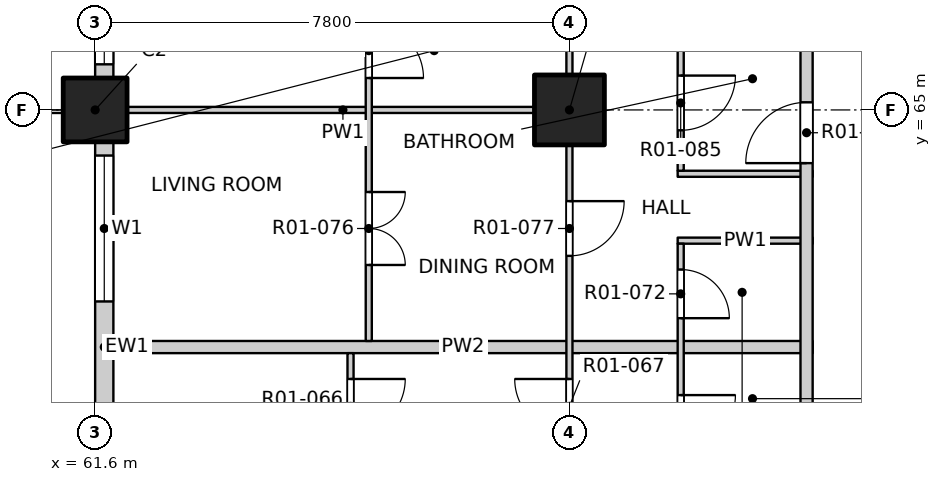
"""IFC4 building model, lengths in metres.
Left out: names, types, materials, properties, quantities, classifications, styles, units other than length and angle.
Written with IfcOpenShell. Run it as: python <this file> out.ifc"""

import sys

from ifc_helpers import new_model, si_unit, direction, frame, frame_2d, origin, origin_2d, place, context, subcontext, project, spatial, rectangle, extrude, element, fill, save


model = new_model("IFC4")
c1 = context("Model", 3, precision=1e-05, world=origin(), true_north=direction((0.0, 1.0)))
c2 = subcontext(c1, "Body", "Model", "MODEL_VIEW")
j1 = project(units=[si_unit("LENGTHUNIT", "METRE"), si_unit("PLANEANGLEUNIT", "RADIAN")], contexts=[c1])
p1 = place(None, origin())
s1 = spatial("IfcSite", under=j1, at=p1, CompositionType="ELEMENT")
p2 = place(p1, origin())
s2 = spatial("IfcBuilding", under=s1, at=p2, CompositionType="ELEMENT")
p3 = place(p2, frame((0.0, 0.0, 26.3)))
s3 = spatial("IfcBuildingStorey", under=s2, at=p3, CompositionType="ELEMENT", Elevation=26.3)
p4 = place(p3, frame((61.6, 65.0, -0.25), z_axis=(0.0, 0.0, 1.0), x_axis=(1.0, 0.0, 0.0)))
e1 = element("IfcColumn", 1, at=p4, inside=s3, PredefinedType="COLUMN", context=c2, shape_type="SweptSolid", body=[
    extrude(rectangle(XDim=1.05, YDim=1.05, at=origin_2d()), origin(), (0.0, 0.0, 1.0), 3.4),
])
p5 = place(p3, frame((69.4, 65.0, -0.25), z_axis=(0.0, 0.0, 1.0), x_axis=(1.0, 0.0, 0.0)))
e2 = element("IfcColumn", 2, at=p5, inside=s3, PredefinedType="COLUMN", context=c2, shape_type="SweptSolid", body=[
    extrude(rectangle(XDim=1.15, YDim=1.15, at=origin_2d()), origin(), (0.0, 0.0, 1.0), 3.4),
])
p6 = place(p3, frame((61.75, 57.725, 0.0), z_axis=(0.0, 0.0, 1.0), x_axis=(0.0, 1.0, 0.0)))
e3 = element("IfcWall", 3, at=p6, inside=s3, PredefinedType="SOLIDWALL", context=c2, shape_type="SweptSolid", body=[
    extrude(rectangle(XDim=6.75, YDim=0.3, at=frame_2d((3.375, 0.0))), origin(), (0.0, 0.0, 1.0), 2.7),
])
p7 = place(p6, frame((0.525, 0.0, 0.0)))
e4 = element("IfcOpeningElement", 4, at=p7, cuts=e3, PredefinedType="OPENING", context=c2, shape_type="SweptSolid", body=[
    extrude(rectangle(XDim=1.8, YDim=2.4, at=frame_2d((0.9, 1.2))), frame((0.0, 0.16, 0.0), z_axis=(0.0, -1.0, 0.0), x_axis=(1.0, 0.0, 0.0)), (0.0, 0.0, 1.0), 0.32),
])
p8 = place(p6, frame((4.125, 0.0, 0.9)))
e5 = element("IfcOpeningElement", 5, at=p8, cuts=e3, PredefinedType="OPENING", context=c2, shape_type="SweptSolid", body=[
    extrude(rectangle(XDim=2.4, YDim=1.8, at=frame_2d((1.2, 0.9))), frame((0.0, 0.16, 0.0), z_axis=(0.0, -1.0, 0.0), x_axis=(1.0, 0.0, 0.0)), (0.0, 0.0, 1.0), 0.32),
])
p9 = place(p3, frame((61.75, 65.525, 0.0), z_axis=(0.0, 0.0, 1.0), x_axis=(0.0, 1.0, 0.0)))
e6 = element("IfcWall", 6, at=p9, inside=s3, PredefinedType="SOLIDWALL", context=c2, shape_type="SweptSolid", body=[
    extrude(rectangle(XDim=6.75, YDim=0.3, at=frame_2d((3.375, 0.0))), origin(), (0.0, 0.0, 1.0), 2.7),
])
p10 = place(p9, frame((0.225, 0.0, 0.9)))
e7 = element("IfcOpeningElement", 7, at=p10, cuts=e6, PredefinedType="OPENING", context=c2, shape_type="SweptSolid", body=[
    extrude(rectangle(XDim=2.4, YDim=1.8, at=frame_2d((1.2, 0.9))), frame((0.0, 0.16, 0.0), z_axis=(0.0, -1.0, 0.0), x_axis=(1.0, 0.0, 0.0)), (0.0, 0.0, 1.0), 0.32),
])
p11 = place(p9, frame((4.125, 0.0, 0.9)))
e8 = element("IfcOpeningElement", 8, at=p11, cuts=e6, PredefinedType="OPENING", context=c2, shape_type="SweptSolid", body=[
    extrude(rectangle(XDim=2.4, YDim=1.8, at=frame_2d((1.2, 0.9))), frame((0.0, 0.16, 0.0), z_axis=(0.0, -1.0, 0.0), x_axis=(1.0, 0.0, 0.0)), (0.0, 0.0, 1.0), 0.32),
])
p12 = place(p3, frame((61.9, 61.1, 0.0), z_axis=(0.0, 0.0, 1.0), x_axis=(1.0, 0.0, 0.0)))
e9 = element("IfcWall", 9, at=p12, inside=s3, PredefinedType="PARTITIONING", context=c2, shape_type="SweptSolid", body=[
    extrude(rectangle(XDim=11.5, YDim=0.2, at=frame_2d((5.75, 0.0))), origin(), (0.0, 0.0, 1.0), 3.15),
])
for number, where, z_axis, x_axis in (
    (10, (71.18, 62.85, 0.0), (0.0, 0.0, 1.0), (1.0, 0.0, 0.0)),
    (11, (71.18, 63.95, 0.0), (0.0, 0.0, 1.0), (1.0, 0.0, 0.0)),
):
    element("IfcWall", number, at=place(p3, frame(where, z_axis=z_axis, x_axis=x_axis)), inside=s3, PredefinedType="PARTITIONING", context=c2, shape_type="SweptSolid", body=[
        extrude(rectangle(XDim=2.22, YDim=0.1, at=frame_2d((1.11, 0.0))), origin(), (0.0, 0.0, 1.0), 3.15),
    ])
p13 = place(p3, frame((61.9, 65.0, 0.0), z_axis=(0.0, 0.0, 1.0), x_axis=(1.0, 0.0, 0.0)))
e12 = element("IfcWall", 12, at=p13, inside=s3, PredefinedType="PARTITIONING", context=c2, shape_type="SweptSolid", body=[
    extrude(rectangle(XDim=7.55, YDim=0.1, at=frame_2d((3.775, 0.0))), origin(), (0.0, 0.0, 1.0), 2.55),
])
p14 = place(p3, frame((65.8, 41.9, 0.0), z_axis=(0.0, 0.0, 1.0), x_axis=(0.0, 1.0, 0.0)))
e13 = element("IfcWall", 13, at=p14, inside=s3, PredefinedType="PARTITIONING", context=c2, shape_type="SweptSolid", body=[
    extrude(rectangle(XDim=19.1, YDim=0.1, at=frame_2d((9.55, 0.0))), origin(), (0.0, 0.0, 1.0), 3.15),
])
p15 = place(p14, frame((1.05, 0.0, 0.0)))
e14 = element("IfcOpeningElement", 14, at=p15, cuts=e13, PredefinedType="OPENING", context=c2, shape_type="SweptSolid", body=[
    extrude(rectangle(XDim=1.2, YDim=2.1, at=frame_2d((0.6, 1.05))), frame((0.0, 0.06, 0.0), z_axis=(0.0, -1.0, 0.0), x_axis=(1.0, 0.0, 0.0)), (0.0, 0.0, 1.0), 0.12),
])
p16 = place(p14, frame((4.95, 0.0, 0.0)))
e15 = element("IfcOpeningElement", 15, at=p16, cuts=e13, PredefinedType="OPENING", context=c2, shape_type="SweptSolid", body=[
    extrude(rectangle(XDim=1.2, YDim=2.1, at=frame_2d((0.6, 1.05))), frame((0.0, 0.06, 0.0), z_axis=(0.0, -1.0, 0.0), x_axis=(1.0, 0.0, 0.0)), (0.0, 0.0, 1.0), 0.12),
])
p17 = place(p14, frame((8.85, 0.0, 0.0)))
e16 = element("IfcOpeningElement", 16, at=p17, cuts=e13, PredefinedType="OPENING", context=c2, shape_type="SweptSolid", body=[
    extrude(rectangle(XDim=1.2, YDim=2.1, at=frame_2d((0.6, 1.05))), frame((0.0, 0.06, 0.0), z_axis=(0.0, -1.0, 0.0), x_axis=(1.0, 0.0, 0.0)), (0.0, 0.0, 1.0), 0.12),
])
p18 = place(p14, frame((11.925, 0.0, 0.0)))
e17 = element("IfcOpeningElement", 17, at=p18, cuts=e13, PredefinedType="OPENING", context=c2, shape_type="SweptSolid", body=[
    extrude(rectangle(XDim=0.9, YDim=2.1, at=frame_2d((0.45, 1.05))), frame((0.0, 0.06, 0.0), z_axis=(0.0, -1.0, 0.0), x_axis=(1.0, 0.0, 0.0)), (0.0, 0.0, 1.0), 0.12),
])
p19 = place(p14, frame((13.875, 0.0, 0.0)))
e18 = element("IfcOpeningElement", 18, at=p19, cuts=e13, PredefinedType="OPENING", context=c2, shape_type="SweptSolid", body=[
    extrude(rectangle(XDim=0.9, YDim=2.1, at=frame_2d((0.45, 1.05))), frame((0.0, 0.06, 0.0), z_axis=(0.0, -1.0, 0.0), x_axis=(1.0, 0.0, 0.0)), (0.0, 0.0, 1.0), 0.12),
])
p20 = place(p14, frame((15.825, 0.0, 0.0)))
e19 = element("IfcOpeningElement", 19, at=p20, cuts=e13, PredefinedType="OPENING", context=c2, shape_type="SweptSolid", body=[
    extrude(rectangle(XDim=0.9, YDim=2.1, at=frame_2d((0.45, 1.05))), frame((0.0, 0.06, 0.0), z_axis=(0.0, -1.0, 0.0), x_axis=(1.0, 0.0, 0.0)), (0.0, 0.0, 1.0), 0.12),
])
p21 = place(p14, frame((17.775, 0.0, 0.0)))
e20 = element("IfcOpeningElement", 20, at=p21, cuts=e13, PredefinedType="OPENING", context=c2, shape_type="SweptSolid", body=[
    extrude(rectangle(XDim=0.9, YDim=2.1, at=frame_2d((0.45, 1.05))), frame((0.0, 0.06, 0.0), z_axis=(0.0, -1.0, 0.0), x_axis=(1.0, 0.0, 0.0)), (0.0, 0.0, 1.0), 0.12),
])
p22 = place(p3, frame((66.1, 61.2, 0.0), z_axis=(0.0, 0.0, 1.0), x_axis=(0.0, 1.0, 0.0)))
e21 = element("IfcWall", 21, at=p22, inside=s3, PredefinedType="PARTITIONING", context=c2, shape_type="SweptSolid", body=[
    extrude(rectangle(XDim=7.6, YDim=0.1, at=frame_2d((3.8, 0.0))), origin(), (0.0, 0.0, 1.0), 3.15),
])
p23 = place(p22, frame((1.25, 0.0, 0.0)))
e22 = element("IfcOpeningElement", 22, at=p23, cuts=e21, PredefinedType="OPENING", context=c2, shape_type="SweptSolid", body=[
    extrude(rectangle(XDim=1.2, YDim=2.1, at=frame_2d((0.6, 1.05))), frame((0.0, 0.06, 0.0), z_axis=(0.0, -1.0, 0.0), x_axis=(1.0, 0.0, 0.0)), (0.0, 0.0, 1.0), 0.12),
])
p24 = place(p22, frame((4.325, 0.0, 0.0)))
e23 = element("IfcOpeningElement", 23, at=p24, cuts=e21, PredefinedType="OPENING", context=c2, shape_type="SweptSolid", body=[
    extrude(rectangle(XDim=0.9, YDim=2.1, at=frame_2d((0.45, 1.05))), frame((0.0, 0.06, 0.0), z_axis=(0.0, -1.0, 0.0), x_axis=(1.0, 0.0, 0.0)), (0.0, 0.0, 1.0), 0.12),
])
p25 = place(p22, frame((6.275, 0.0, 0.0)))
e24 = element("IfcOpeningElement", 24, at=p25, cuts=e21, PredefinedType="OPENING", context=c2, shape_type="SweptSolid", body=[
    extrude(rectangle(XDim=0.9, YDim=2.1, at=frame_2d((0.45, 1.05))), frame((0.0, 0.06, 0.0), z_axis=(0.0, -1.0, 0.0), x_axis=(1.0, 0.0, 0.0)), (0.0, 0.0, 1.0), 0.12),
])
p26 = place(p3, frame((69.4, 49.4, 0.0), z_axis=(0.0, 0.0, 1.0), x_axis=(0.0, 1.0, 0.0)))
e25 = element("IfcWall", 25, at=p26, inside=s3, PredefinedType="PARTITIONING", context=c2, shape_type="SweptSolid", body=[
    extrude(rectangle(XDim=31.2, YDim=0.1, at=frame_2d((15.6, 0.0))), origin(), (0.0, 0.0, 1.0), 3.15),
])
p27 = place(p26, frame((1.5, 0.0, 0.0)))
e26 = element("IfcOpeningElement", 26, at=p27, cuts=e25, PredefinedType="OPENING", context=c2, shape_type="SweptSolid", body=[
    extrude(rectangle(XDim=0.9, YDim=2.1, at=frame_2d((0.45, 1.05))), frame((0.0, 0.06, 0.0), z_axis=(0.0, -1.0, 0.0), x_axis=(1.0, 0.0, 0.0)), (0.0, 0.0, 1.0), 0.12),
])
p28 = place(p26, frame((6.225, 0.0, 0.0)))
e27 = element("IfcOpeningElement", 27, at=p28, cuts=e25, PredefinedType="OPENING", context=c2, shape_type="SweptSolid", body=[
    extrude(rectangle(XDim=0.9, YDim=2.1, at=frame_2d((0.45, 1.05))), frame((0.0, 0.06, 0.0), z_axis=(0.0, -1.0, 0.0), x_axis=(1.0, 0.0, 0.0)), (0.0, 0.0, 1.0), 0.12),
])
p29 = place(p26, frame((10.275, 0.0, 0.0)))
e28 = element("IfcOpeningElement", 28, at=p29, cuts=e25, PredefinedType="OPENING", context=c2, shape_type="SweptSolid", body=[
    extrude(rectangle(XDim=0.9, YDim=2.1, at=frame_2d((0.45, 1.05))), frame((0.0, 0.06, 0.0), z_axis=(0.0, -1.0, 0.0), x_axis=(1.0, 0.0, 0.0)), (0.0, 0.0, 1.0), 0.12),
])
p30 = place(p26, frame((13.2, 0.0, 0.0)))
e29 = element("IfcOpeningElement", 29, at=p30, cuts=e25, PredefinedType="OPENING", context=c2, shape_type="SweptSolid", body=[
    extrude(rectangle(XDim=0.9, YDim=2.1, at=frame_2d((0.45, 1.05))), frame((0.0, 0.06, 0.0), z_axis=(0.0, -1.0, 0.0), x_axis=(1.0, 0.0, 0.0)), (0.0, 0.0, 1.0), 0.12),
])
p31 = place(p26, frame((18.075, 0.0, 0.0)))
e30 = element("IfcOpeningElement", 30, at=p31, cuts=e25, PredefinedType="OPENING", context=c2, shape_type="SweptSolid", body=[
    extrude(rectangle(XDim=0.9, YDim=2.1, at=frame_2d((0.45, 1.05))), frame((0.0, 0.06, 0.0), z_axis=(0.0, -1.0, 0.0), x_axis=(1.0, 0.0, 0.0)), (0.0, 0.0, 1.0), 0.12),
])
p32 = place(p26, frame((21.8, 0.0, 0.0)))
e31 = element("IfcOpeningElement", 31, at=p32, cuts=e25, PredefinedType="OPENING", context=c2, shape_type="SweptSolid", body=[
    extrude(rectangle(XDim=0.9, YDim=2.1, at=frame_2d((0.45, 1.05))), frame((0.0, 0.06, 0.0), z_axis=(0.0, -1.0, 0.0), x_axis=(1.0, 0.0, 0.0)), (0.0, 0.0, 1.0), 0.12),
])
p33 = place(p26, frame((24.9, 0.0, 0.0)))
e32 = element("IfcOpeningElement", 32, at=p33, cuts=e25, PredefinedType="OPENING", context=c2, shape_type="SweptSolid", body=[
    extrude(rectangle(XDim=0.9, YDim=2.1, at=frame_2d((0.45, 1.05))), frame((0.0, 0.06, 0.0), z_axis=(0.0, -1.0, 0.0), x_axis=(1.0, 0.0, 0.0)), (0.0, 0.0, 1.0), 0.12),
])
p34 = place(p26, frame((29.6, 0.0, 0.0)))
e33 = element("IfcOpeningElement", 33, at=p34, cuts=e25, PredefinedType="OPENING", context=c2, shape_type="SweptSolid", body=[
    extrude(rectangle(XDim=0.9, YDim=2.1, at=frame_2d((0.45, 1.05))), frame((0.0, 0.06, 0.0), z_axis=(0.0, -1.0, 0.0), x_axis=(1.0, 0.0, 0.0)), (0.0, 0.0, 1.0), 0.12),
])
p35 = place(p3, frame((71.23, 55.6, 0.0), z_axis=(0.0, 0.0, 1.0), x_axis=(0.0, 1.0, 0.0)))
e34 = element("IfcWall", 34, at=p35, inside=s3, PredefinedType="PARTITIONING", context=c2, shape_type="SweptSolid", body=[
    extrude(rectangle(XDim=7.2, YDim=0.1, at=frame_2d((3.6, 0.0))), origin(), (0.0, 0.0, 1.0), 3.15),
])
p36 = place(p35, frame((1.035, 0.0, 0.0)))
e35 = element("IfcOpeningElement", 35, at=p36, cuts=e34, PredefinedType="OPENING", context=c2, shape_type="SweptSolid", body=[
    extrude(rectangle(XDim=0.9, YDim=2.1, at=frame_2d((0.45, 1.05))), frame((0.0, 0.06, 0.0), z_axis=(0.0, -1.0, 0.0), x_axis=(1.0, 0.0, 0.0)), (0.0, 0.0, 1.0), 0.12),
])
p37 = place(p35, frame((3.81, 0.0, 0.0)))
e36 = element("IfcOpeningElement", 36, at=p37, cuts=e34, PredefinedType="OPENING", context=c2, shape_type="SweptSolid", body=[
    extrude(rectangle(XDim=0.9, YDim=2.1, at=frame_2d((0.45, 1.05))), frame((0.0, 0.06, 0.0), z_axis=(0.0, -1.0, 0.0), x_axis=(1.0, 0.0, 0.0)), (0.0, 0.0, 1.0), 0.12),
])
p38 = place(p35, frame((5.975, 0.0, 0.0)))
e37 = element("IfcOpeningElement", 37, at=p38, cuts=e34, PredefinedType="OPENING", context=c2, shape_type="SweptSolid", body=[
    extrude(rectangle(XDim=0.8, YDim=2.1, at=frame_2d((0.4, 1.05))), frame((0.0, 0.06, 0.0), z_axis=(0.0, -1.0, 0.0), x_axis=(1.0, 0.0, 0.0)), (0.0, 0.0, 1.0), 0.12),
])
p39 = place(p3, frame((71.23, 64.0, 0.0), z_axis=(0.0, 0.0, 1.0), x_axis=(0.0, 1.0, 0.0)))
e38 = element("IfcWall", 38, at=p39, inside=s3, PredefinedType="PARTITIONING", context=c2, shape_type="SweptSolid", body=[
    extrude(rectangle(XDim=6.3, YDim=0.1, at=frame_2d((3.15, 0.0))), origin(), (0.0, 0.0, 1.0), 3.15),
])
p40 = place(p39, frame((0.665, 0.0, 0.0)))
e39 = element("IfcOpeningElement", 39, at=p40, cuts=e38, PredefinedType="OPENING", context=c2, shape_type="SweptSolid", body=[
    extrude(rectangle(XDim=0.9, YDim=2.1, at=frame_2d((0.45, 1.05))), frame((0.0, 0.06, 0.0), z_axis=(0.0, -1.0, 0.0), x_axis=(1.0, 0.0, 0.0)), (0.0, 0.0, 1.0), 0.12),
])
p41 = place(p39, frame((3.14, 0.0, 0.0)))
e40 = element("IfcOpeningElement", 40, at=p41, cuts=e38, PredefinedType="OPENING", context=c2, shape_type="SweptSolid", body=[
    extrude(rectangle(XDim=0.9, YDim=2.1, at=frame_2d((0.45, 1.05))), frame((0.0, 0.06, 0.0), z_axis=(0.0, -1.0, 0.0), x_axis=(1.0, 0.0, 0.0)), (0.0, 0.0, 1.0), 0.12),
])
p42 = place(p39, frame((5.175, 0.0, 0.0)))
e41 = element("IfcOpeningElement", 41, at=p42, cuts=e38, PredefinedType="OPENING", context=c2, shape_type="SweptSolid", body=[
    extrude(rectangle(XDim=0.9, YDim=2.1, at=frame_2d((0.45, 1.05))), frame((0.0, 0.06, 0.0), z_axis=(0.0, -1.0, 0.0), x_axis=(1.0, 0.0, 0.0)), (0.0, 0.0, 1.0), 0.12),
])
p43 = place(p3, frame((73.3, 53.4, 0.0), z_axis=(0.0, 0.0, 1.0), x_axis=(0.0, 1.0, 0.0)))
e42 = element("IfcWall", 42, at=p43, inside=s3, PredefinedType="PARTITIONING", context=c2, shape_type="SweptSolid", body=[
    extrude(rectangle(XDim=31.0, YDim=0.2, at=frame_2d((15.5, 0.0))), origin(), (0.0, 0.0, 1.0), 3.15),
])
p44 = place(p43, frame((2.325, 0.0, 0.0)))
e43 = element("IfcOpeningElement", 43, at=p44, cuts=e42, PredefinedType="OPENING", context=c2, shape_type="SweptSolid", body=[
    extrude(rectangle(XDim=1.0, YDim=2.1, at=frame_2d((0.5, 1.05))), frame((0.0, 0.11, 0.0), z_axis=(0.0, -1.0, 0.0), x_axis=(1.0, 0.0, 0.0)), (0.0, 0.0, 1.0), 0.22),
])
p45 = place(p43, frame((10.725, 0.0, 0.0)))
e44 = element("IfcOpeningElement", 44, at=p45, cuts=e42, PredefinedType="OPENING", context=c2, shape_type="SweptSolid", body=[
    extrude(rectangle(XDim=1.0, YDim=2.1, at=frame_2d((0.5, 1.05))), frame((0.0, 0.11, 0.0), z_axis=(0.0, -1.0, 0.0), x_axis=(1.0, 0.0, 0.0)), (0.0, 0.0, 1.0), 0.22),
])
p46 = place(p43, frame((18.225, 0.0, 0.0)))
e45 = element("IfcOpeningElement", 45, at=p46, cuts=e42, PredefinedType="OPENING", context=c2, shape_type="SweptSolid", body=[
    extrude(rectangle(XDim=1.0, YDim=2.1, at=frame_2d((0.5, 1.05))), frame((0.0, 0.11, 0.0), z_axis=(0.0, -1.0, 0.0), x_axis=(1.0, 0.0, 0.0)), (0.0, 0.0, 1.0), 0.22),
])
p47 = place(p43, frame((25.925, 0.0, 0.0)))
e46 = element("IfcOpeningElement", 46, at=p47, cuts=e42, PredefinedType="OPENING", context=c2, shape_type="SweptSolid", body=[
    extrude(rectangle(XDim=1.0, YDim=2.1, at=frame_2d((0.5, 1.05))), frame((0.0, 0.11, 0.0), z_axis=(0.0, -1.0, 0.0), x_axis=(1.0, 0.0, 0.0)), (0.0, 0.0, 1.0), 0.22),
])
p48 = place(p8, origin())
e47 = element("IfcWindow", 47, at=p48, inside=s3, PartitioningType="DOUBLE_PANEL_VERTICAL", PredefinedType="WINDOW", context=c2, shape_type="SweptSolid", body=[
    extrude(rectangle(XDim=2.4, YDim=1.8, at=frame_2d((1.2, 0.9))), frame((0.0, 0.03, 0.0), z_axis=(0.0, -1.0, 0.0), x_axis=(1.0, 0.0, 0.0)), (0.0, 0.0, 1.0), 0.06),
])
fill(e5, e47)
p49 = place(p10, origin())
e48 = element("IfcWindow", 48, at=p49, inside=s3, PartitioningType="DOUBLE_PANEL_VERTICAL", PredefinedType="WINDOW", context=c2, shape_type="SweptSolid", body=[
    extrude(rectangle(XDim=2.4, YDim=1.8, at=frame_2d((1.2, 0.9))), frame((0.0, 0.03, 0.0), z_axis=(0.0, -1.0, 0.0), x_axis=(1.0, 0.0, 0.0)), (0.0, 0.0, 1.0), 0.06),
])
fill(e7, e48)
p50 = place(p37, origin())
e49 = element("IfcDoor", 49, at=p50, inside=s3, OperationType="SINGLE_SWING_LEFT", PredefinedType="DOOR", context=c2, shape_type="SweptSolid", body=[
    extrude(rectangle(XDim=0.9, YDim=2.1, at=frame_2d((0.45, 1.05))), frame((0.0, 0.025, 0.0), z_axis=(0.0, -1.0, 0.0), x_axis=(1.0, 0.0, 0.0)), (0.0, 0.0, 1.0), 0.05),
])
fill(e36, e49)
p51 = place(p21, origin())
e50 = element("IfcDoor", 50, at=p51, inside=s3, OperationType="SINGLE_SWING_LEFT", PredefinedType="DOOR", context=c2, shape_type="SweptSolid", body=[
    extrude(rectangle(XDim=0.9, YDim=2.1, at=frame_2d((0.45, 1.05))), frame((0.0, 0.025, 0.0), z_axis=(0.0, -1.0, 0.0), x_axis=(1.0, 0.0, 0.0)), (0.0, 0.0, 1.0), 0.05),
])
fill(e20, e50)
p52 = place(p29, origin())
e51 = element("IfcDoor", 51, at=p52, inside=s3, OperationType="SINGLE_SWING_RIGHT", PredefinedType="DOOR", context=c2, shape_type="SweptSolid", body=[
    extrude(rectangle(XDim=0.9, YDim=2.1, at=frame_2d((0.45, 1.05))), frame((0.0, 0.025, 0.0), z_axis=(0.0, -1.0, 0.0), x_axis=(1.0, 0.0, 0.0)), (0.0, 0.0, 1.0), 0.05),
])
fill(e28, e51)
p53 = place(p38, origin())
e52 = element("IfcDoor", 52, at=p53, inside=s3, OperationType="SINGLE_SWING_RIGHT", PredefinedType="DOOR", context=c2, shape_type="SweptSolid", body=[
    extrude(rectangle(XDim=0.8, YDim=2.1, at=frame_2d((0.4, 1.05))), frame((0.0, 0.025, 0.0), z_axis=(0.0, -1.0, 0.0), x_axis=(1.0, 0.0, 0.0)), (0.0, 0.0, 1.0), 0.05),
])
fill(e37, e52)
p54 = place(p23, origin())
e53 = element("IfcDoor", 53, at=p54, inside=s3, OperationType="DOUBLE_DOOR_SINGLE_SWING", PredefinedType="DOOR", context=c2, shape_type="SweptSolid", body=[
    extrude(rectangle(XDim=1.2, YDim=2.1, at=frame_2d((0.6, 1.05))), frame((0.0, 0.025, 0.0), z_axis=(0.0, -1.0, 0.0), x_axis=(1.0, 0.0, 0.0)), (0.0, 0.0, 1.0), 0.05),
])
fill(e22, e53)
p55 = place(p30, origin())
e54 = element("IfcDoor", 54, at=p55, inside=s3, OperationType="SINGLE_SWING_LEFT", PredefinedType="DOOR", context=c2, shape_type="SweptSolid", body=[
    extrude(rectangle(XDim=0.9, YDim=2.1, at=frame_2d((0.45, 1.05))), frame((0.0, 0.025, 0.0), z_axis=(0.0, -1.0, 0.0), x_axis=(1.0, 0.0, 0.0)), (0.0, 0.0, 1.0), 0.05),
])
fill(e29, e54)
p56 = place(p45, origin())
e55 = element("IfcDoor", 55, at=p56, inside=s3, OperationType="SINGLE_SWING_RIGHT", PredefinedType="DOOR", context=c2, shape_type="SweptSolid", body=[
    extrude(rectangle(XDim=1.0, YDim=2.1, at=frame_2d((0.5, 1.05))), frame((0.0, 0.025, 0.0), z_axis=(0.0, -1.0, 0.0), x_axis=(1.0, 0.0, 0.0)), (0.0, 0.0, 1.0), 0.05),
])
fill(e44, e55)
p57 = place(p40, origin())
e56 = element("IfcDoor", 56, at=p57, inside=s3, OperationType="SINGLE_SWING_LEFT", PredefinedType="DOOR", context=c2, shape_type="SweptSolid", body=[
    extrude(rectangle(XDim=0.9, YDim=2.1, at=frame_2d((0.45, 1.05))), frame((0.0, 0.025, 0.0), z_axis=(0.0, -1.0, 0.0), x_axis=(1.0, 0.0, 0.0)), (0.0, 0.0, 1.0), 0.05),
])
fill(e39, e56)
p58 = place(p24, origin())
e57 = element("IfcDoor", 57, at=p58, inside=s3, OperationType="SINGLE_SWING_RIGHT", PredefinedType="DOOR", context=c2, shape_type="SweptSolid", body=[
    extrude(rectangle(XDim=0.9, YDim=2.1, at=frame_2d((0.45, 1.05))), frame((0.0, 0.025, 0.0), z_axis=(0.0, -1.0, 0.0), x_axis=(1.0, 0.0, 0.0)), (0.0, 0.0, 1.0), 0.05),
])
fill(e23, e57)
save(model, sys.argv[1])
